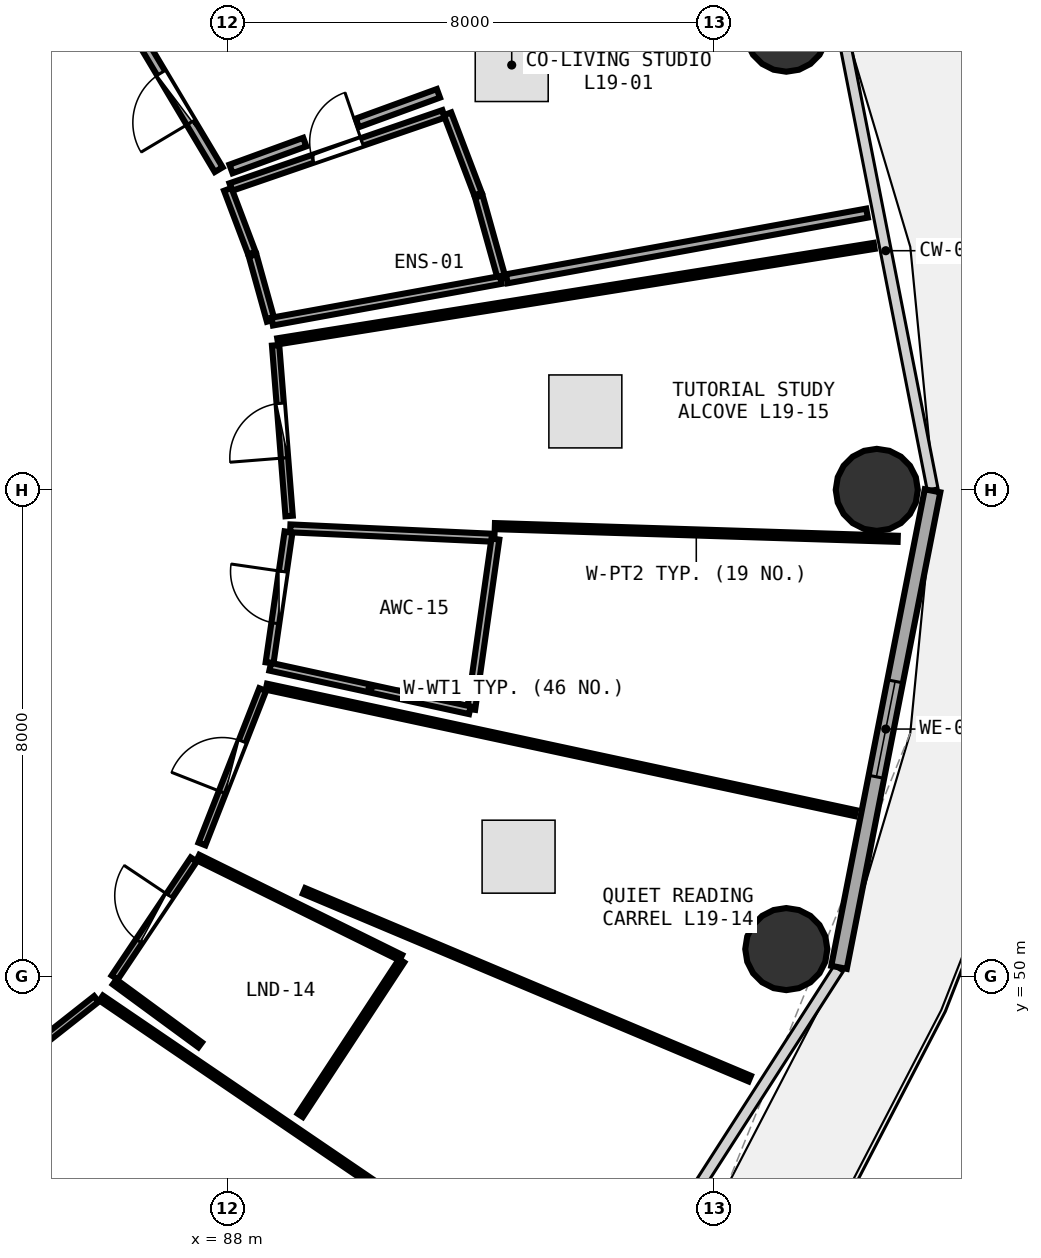
"""IFC4 building model, lengths in metres.
Left out: names, types, materials, properties, quantities, classifications, styles, units other than length and angle.
Written with IfcOpenShell. Run it as: python <this file> out.ifc"""

import sys

from ifc_helpers import new_model, si_unit, direction, frame, frame_2d, origin, origin_2d, place, context, subcontext, project, spatial, rectangle, circle, extrude, element, fill, save


model = new_model("IFC4")
c1 = context("Model", 3, precision=1e-05, world=origin(), true_north=direction((0.0, 1.0)))
c2 = subcontext(c1, "Body", "Model", "MODEL_VIEW")
j1 = project(units=[si_unit("LENGTHUNIT", "METRE"), si_unit("PLANEANGLEUNIT", "RADIAN")], contexts=[c1])
p1 = place(None, origin())
s1 = spatial("IfcSite", under=j1, at=p1, CompositionType="ELEMENT")
p2 = place(p1, origin())
s2 = spatial("IfcBuilding", under=s1, at=p2, CompositionType="ELEMENT")
p3 = place(p2, frame((0.0, 0.0, 76.35)))
s3 = spatial("IfcBuildingStorey", under=s2, at=p3, CompositionType="ELEMENT", Elevation=76.35)
for number, where, z_axis, x_axis in (
    (1, (98.68, 58.0, 0.0), (0.0, 0.0, 1.0), (1.0, 0.0, 0.0)),
    (2, (97.192, 65.552, 0.0), (0.0, 0.0, 1.0), (1.0, 0.0, 0.0)),
    (3, (97.192, 50.448, 0.0), (0.0, 0.0, 1.0), (1.0, 0.0, 0.0)),
):
    element("IfcColumn", number, at=place(p3, frame(where, z_axis=z_axis, x_axis=x_axis)), inside=s3, PredefinedType="COLUMN", context=c2, shape_type="SweptSolid", body=[
        extrude(circle(Radius=0.675, at=origin_2d()), origin(), (0.0, 0.0, 1.0), 3.75),
    ])
p4 = place(p3, frame((98.059, 50.148, 0.0), z_axis=(0.0, 0.0, 1.0), x_axis=(0.192581843632, 0.981280914674, 0.0)))
e4 = element("IfcWall", 4, at=p4, inside=s3, PredefinedType="SOLIDWALL", context=c2, shape_type="SweptSolid", body=[
    extrude(rectangle(XDim=7.987, YDim=0.26, at=frame_2d((3.993, 0.0))), origin(), (0.0, 0.0, 1.0), 3.475),
])
p5 = place(p4, frame((3.193, 0.0, 0.85)))
e5 = element("IfcOpeningElement", 5, at=p5, cuts=e4, PredefinedType="OPENING", context=c2, shape_type="SweptSolid", body=[
    extrude(rectangle(XDim=1.6, YDim=1.45, at=frame_2d((0.8, 0.725))), frame((0.0, 0.14, 0.0), z_axis=(0.0, -1.0, 0.0), x_axis=(1.0, 0.0, 0.0)), (0.0, 0.0, 1.0), 0.28),
])
p6 = place(p3, frame((88.056, 62.98, 0.0), z_axis=(0.0, 0.0, 1.0), x_axis=(0.94570750663, 0.325018940838, 0.0)))
e6 = element("IfcWall", 6, at=p6, inside=s3, PredefinedType="PLUMBINGWALL", context=c2, shape_type="SweptSolid", body=[
    extrude(rectangle(XDim=3.702, YDim=0.13, at=frame_2d((1.851, 0.0))), origin(), (0.0, 0.0, 1.0), 3.175),
])
p7 = place(p6, frame((1.421, 0.0, 0.0)))
e7 = element("IfcOpeningElement", 7, at=p7, cuts=e6, PredefinedType="OPENING", context=c2, shape_type="SweptSolid", body=[
    extrude(rectangle(XDim=0.86, YDim=2.05, at=frame_2d((0.43, 1.025))), frame((0.0, 0.075, 0.0), z_axis=(0.0, -1.0, 0.0), x_axis=(1.0, 0.0, 0.0)), (0.0, 0.0, 1.0), 0.15),
])
p8 = place(p3, frame((87.856, 63.267, 0.0), z_axis=(0.0, 0.0, 1.0), x_axis=(-0.512288635556, 0.858813340535, 0.0)))
e8 = element("IfcWall", 8, at=p8, inside=s3, PredefinedType="PARTITIONING", context=c2, shape_type="SweptSolid", body=[
    extrude(rectangle(XDim=2.751, YDim=0.15, at=frame_2d((1.375, 0.0))), origin(), (0.0, 0.0, 1.0), 2.925),
])
p9 = place(p8, frame((0.901, 0.0, 0.0)))
e9 = element("IfcOpeningElement", 9, at=p9, cuts=e8, PredefinedType="OPENING", context=c2, shape_type="SweptSolid", body=[
    extrude(rectangle(XDim=0.95, YDim=2.08, at=frame_2d((0.475, 1.04))), frame((0.0, 0.085, 0.0), z_axis=(0.0, -1.0, 0.0), x_axis=(1.0, 0.0, 0.0)), (0.0, 0.0, 1.0), 0.17),
])
p10 = place(p3, frame((81.494, 46.198, 0.0), z_axis=(0.0, 0.0, 1.0), x_axis=(0.785315722545, 0.619095482074, 0.0)))
e10 = element("IfcWall", 10, at=p10, inside=s3, PredefinedType="PARTITIONING", context=c2, shape_type="SweptSolid", body=[
    extrude(rectangle(XDim=5.54, YDim=0.12, at=frame_2d((2.77, 0.0))), origin(), (0.0, 0.0, 1.0), 2.925),
])
p11 = place(p10, frame((2.32, 0.0, 0.0)))
e11 = element("IfcOpeningElement", 11, at=p11, cuts=e10, PredefinedType="OPENING", context=c2, shape_type="SweptSolid", body=[
    extrude(rectangle(XDim=0.9, YDim=2.08, at=frame_2d((0.45, 1.04))), frame((0.0, 0.07, 0.0), z_axis=(0.0, -1.0, 0.0), x_axis=(1.0, 0.0, 0.0)), (0.0, 0.0, 1.0), 0.14),
])
p12 = place(p3, frame((86.146, 49.981, 0.0), z_axis=(0.0, 0.0, 1.0), x_axis=(0.556604342457, 0.83077771152, 0.0)))
e12 = element("IfcWall", 12, at=p12, inside=s3, PredefinedType="PARTITIONING", context=c2, shape_type="SweptSolid", body=[
    extrude(rectangle(XDim=2.336, YDim=0.12, at=frame_2d((1.168, 0.0))), origin(), (0.0, 0.0, 1.0), 2.925),
])
p13 = place(p12, frame((0.718, 0.0, 0.0)))
e13 = element("IfcOpeningElement", 13, at=p13, cuts=e12, PredefinedType="OPENING", context=c2, shape_type="SweptSolid", body=[
    extrude(rectangle(XDim=0.9, YDim=2.08, at=frame_2d((0.45, 1.04))), frame((0.0, 0.07, 0.0), z_axis=(0.0, -1.0, 0.0), x_axis=(1.0, 0.0, 0.0)), (0.0, 0.0, 1.0), 0.14),
])
p14 = place(p3, frame((87.582, 52.177, 0.0), z_axis=(0.0, 0.0, 1.0), x_axis=(0.365846135531, 0.930675348936, 0.0)))
e14 = element("IfcWall", 14, at=p14, inside=s3, PredefinedType="PARTITIONING", context=c2, shape_type="SweptSolid", body=[
    extrude(rectangle(XDim=2.729, YDim=0.12, at=frame_2d((1.364, 0.0))), origin(), (0.0, 0.0, 1.0), 3.235),
])
p15 = place(p14, frame((0.914, 0.0, 0.0)))
e15 = element("IfcOpeningElement", 15, at=p15, cuts=e14, PredefinedType="OPENING", context=c2, shape_type="SweptSolid", body=[
    extrude(rectangle(XDim=0.9, YDim=2.08, at=frame_2d((0.45, 1.04))), frame((0.0, 0.07, 0.0), z_axis=(0.0, -1.0, 0.0), x_axis=(1.0, 0.0, 0.0)), (0.0, 0.0, 1.0), 0.14),
])
p16 = place(p3, frame((88.694, 55.156, 0.0), z_axis=(0.0, 0.0, 1.0), x_axis=(0.14330641518, 0.989678367637, 0.0)))
e16 = element("IfcWall", 16, at=p16, inside=s3, PredefinedType="PLUMBINGWALL", context=c2, shape_type="SweptSolid", body=[
    extrude(rectangle(XDim=2.176, YDim=0.13, at=frame_2d((1.088, 0.0))), origin(), (0.0, 0.0, 1.0), 3.48),
])
p17 = place(p16, frame((0.658, 0.0, 0.0)))
e17 = element("IfcOpeningElement", 17, at=p17, cuts=e16, PredefinedType="OPENING", context=c2, shape_type="SweptSolid", body=[
    extrude(rectangle(XDim=0.86, YDim=2.05, at=frame_2d((0.43, 1.025))), frame((0.0, 0.075, 0.0), z_axis=(0.0, -1.0, 0.0), x_axis=(1.0, 0.0, 0.0)), (0.0, 0.0, 1.0), 0.15),
])
p18 = place(p3, frame((89.015, 57.571, 0.0), z_axis=(0.0, 0.0, 1.0), x_axis=(-0.079090310477, 0.996867454975, 0.0)))
e18 = element("IfcWall", 18, at=p18, inside=s3, PredefinedType="PARTITIONING", context=c2, shape_type="SweptSolid", body=[
    extrude(rectangle(XDim=2.815, YDim=0.12, at=frame_2d((1.408, 0.0))), origin(), (0.0, 0.0, 1.0), 2.925),
])
p19 = place(p18, frame((0.958, 0.0, 0.0)))
e19 = element("IfcOpeningElement", 19, at=p19, cuts=e18, PredefinedType="OPENING", context=c2, shape_type="SweptSolid", body=[
    extrude(rectangle(XDim=0.9, YDim=2.08, at=frame_2d((0.45, 1.04))), frame((0.0, 0.07, 0.0), z_axis=(0.0, -1.0, 0.0), x_axis=(1.0, 0.0, 0.0)), (0.0, 0.0, 1.0), 0.14),
])
p20 = place(p3, frame((88.713, 60.783, 0.0), z_axis=(0.0, 0.0, 1.0), x_axis=(-0.267768177699, 0.963483369349, 0.0)))
e20 = element("IfcWall", 20, at=p20, inside=s3, PredefinedType="PLUMBINGWALL", context=c2, shape_type="SweptSolid", body=[
    extrude(rectangle(XDim=1.114, YDim=0.13, at=frame_2d((0.557, 0.0))), origin(), (0.0, 0.0, 1.0), 3.48),
])
p21 = place(p3, frame((88.402, 61.895, 0.0), z_axis=(0.0, 0.0, 1.0), x_axis=(-0.353392089541, 0.935475296868, 0.0)))
e21 = element("IfcWall", 21, at=p21, inside=s3, PredefinedType="PLUMBINGWALL", context=c2, shape_type="SweptSolid", body=[
    extrude(rectangle(XDim=1.12, YDim=0.13, at=frame_2d((0.56, 0.0))), origin(), (0.0, 0.0, 1.0), 3.235),
])
p22 = place(p3, frame((91.62, 64.184, 0.0), z_axis=(0.0, 0.0, 1.0), x_axis=(0.355383981736, -0.934720399652, 0.0)))
e22 = element("IfcWall", 22, at=p22, inside=s3, PredefinedType="PLUMBINGWALL", context=c2, shape_type="SweptSolid", body=[
    extrude(rectangle(XDim=1.412, YDim=0.13, at=frame_2d((0.706, 0.0))), origin(), (0.0, 0.0, 1.0), 3.48),
])
p23 = place(p3, frame((92.135, 62.827, 0.0), z_axis=(0.0, 0.0, 1.0), x_axis=(0.268855284743, -0.963180583206, 0.0)))
e23 = element("IfcWall", 23, at=p23, inside=s3, PredefinedType="PLUMBINGWALL", context=c2, shape_type="SweptSolid", body=[
    extrude(rectangle(XDim=1.403, YDim=0.13, at=frame_2d((0.702, 0.0))), origin(), (0.0, 0.0, 1.0), 3.48),
])
p24 = place(p3, frame((92.497, 61.452, 0.0), z_axis=(0.0, 0.0, 1.0), x_axis=(-0.983811592037, -0.17920589101, 0.0)))
e24 = element("IfcWall", 24, at=p24, inside=s3, PredefinedType="PLUMBINGWALL", context=c2, shape_type="SweptSolid", body=[
    extrude(rectangle(XDim=3.821, YDim=0.13, at=frame_2d((1.911, 0.0))), origin(), (0.0, 0.0, 1.0), 3.175),
])
p25 = place(p3, frame((98.52, 62.552, 0.0), z_axis=(0.0, 0.0, 1.0), x_axis=(-0.983768558102, -0.17944197973, 0.0)))
e25 = element("IfcWall", 25, at=p25, inside=s3, PredefinedType="PARTITIONING", context=c2, shape_type="SweptSolid", body=[
    extrude(rectangle(XDim=6.022, YDim=0.15, at=frame_2d((3.011, 0.0))), origin(), (0.0, 0.0, 1.0), 2.975),
])
p26 = place(p3, frame((91.47, 64.521, 0.0), z_axis=(0.0, 0.0, 1.0), x_axis=(-0.939526959999, -0.342474950084, 0.0)))
e26 = element("IfcWall", 26, at=p26, inside=s3, PredefinedType="PARTITIONING", context=c2, shape_type="SweptSolid", body=[
    extrude(rectangle(XDim=1.419, YDim=0.15, at=frame_2d((0.71, 0.0))), origin(), (0.0, 0.0, 1.0), 3.175),
])
p27 = place(p3, frame((89.272, 63.72, 0.0), z_axis=(0.0, 0.0, 1.0), x_axis=(-0.939522570491, -0.342486991779, 0.0)))
e27 = element("IfcWall", 27, at=p27, inside=s3, PredefinedType="PARTITIONING", context=c2, shape_type="SweptSolid", body=[
    extrude(rectangle(XDim=1.291, YDim=0.15, at=frame_2d((0.646, 0.0))), origin(), (0.0, 0.0, 1.0), 3.235),
])
p28 = place(p3, frame((85.925, 49.643, 0.0), z_axis=(0.0, 0.0, 1.0), x_axis=(0.826688408753, -0.562659999319, 0.0)))
e28 = element("IfcWall", 28, at=p28, inside=s3, PredefinedType="PARTITIONING", context=c2, shape_type="SweptSolid", body=[
    extrude(rectangle(XDim=9.539, YDim=0.1, at=frame_2d((4.77, 0.0))), origin(), (0.0, 0.0, 1.0), 2.975),
])
p29 = place(p3, frame((87.516, 51.953, 0.0), z_axis=(0.0, 0.0, 1.0), x_axis=(0.896816300292, -0.442403123328, 0.0)))
e29 = element("IfcWall", 29, at=p29, inside=s3, PredefinedType="PARTITIONING", context=c2, shape_type="SweptSolid", body=[
    extrude(rectangle(XDim=3.72, YDim=0.1, at=frame_2d((1.86, 0.0))), origin(), (0.0, 0.0, 1.0), 2.925),
])
p30 = place(p3, frame((90.866, 50.257, 0.0), z_axis=(0.0, 0.0, 1.0), x_axis=(-0.548626626693, -0.836067476035, 0.0)))
e30 = element("IfcWall", 30, at=p30, inside=s3, PredefinedType="PARTITIONING", context=c2, shape_type="SweptSolid", body=[
    extrude(rectangle(XDim=3.041, YDim=0.1, at=frame_2d((1.521, 0.0))), origin(), (0.0, 0.0, 1.0), 3.175),
])
p31 = place(p3, frame((87.552, 48.874, 0.0), z_axis=(0.0, 0.0, 1.0), x_axis=(-0.805902241708, 0.592048627065, 0.0)))
e31 = element("IfcWall", 31, at=p31, inside=s3, PredefinedType="PARTITIONING", context=c2, shape_type="SweptSolid", body=[
    extrude(rectangle(XDim=1.746, YDim=0.1, at=frame_2d((0.873, 0.0))), origin(), (0.0, 0.0, 1.0), 3.235),
])
p32 = place(p3, frame((88.641, 54.764, 0.0), z_axis=(0.0, 0.0, 1.0), x_axis=(0.97772336182, -0.209897660187, 0.0)))
e32 = element("IfcWall", 32, at=p32, inside=s3, PredefinedType="PARTITIONING", context=c2, shape_type="SweptSolid", body=[
    extrude(rectangle(XDim=9.906, YDim=0.1, at=frame_2d((4.953, 0.0))), origin(), (0.0, 0.0, 1.0), 2.975),
])
p33 = place(p3, frame((96.59, 48.319, 0.0), z_axis=(0.0, 0.0, 1.0), x_axis=(-0.92163364156, 0.388061117279, 0.0)))
e33 = element("IfcWall", 33, at=p33, inside=s3, PredefinedType="PARTITIONING", context=c2, shape_type="SweptSolid", body=[
    extrude(rectangle(XDim=7.953, YDim=0.1, at=frame_2d((3.977, 0.0))), origin(), (0.0, 0.0, 1.0), 2.925),
])
p34 = place(p3, frame((89.034, 57.367, 0.0), z_axis=(0.0, 0.0, 1.0), x_axis=(0.998931351305, -0.046218560994, 0.0)))
e34 = element("IfcWall", 34, at=p34, inside=s3, PredefinedType="PLUMBINGWALL", context=c2, shape_type="SweptSolid", body=[
    extrude(rectangle(XDim=3.36, YDim=0.13, at=frame_2d((1.68, 0.0))), origin(), (0.0, 0.0, 1.0), 3.175),
])
p35 = place(p3, frame((92.407, 57.191, 0.0), z_axis=(0.0, 0.0, 1.0), x_axis=(-0.140575090878, -0.990070019658, 0.0)))
e35 = element("IfcWall", 35, at=p35, inside=s3, PredefinedType="PLUMBINGWALL", context=c2, shape_type="SweptSolid", body=[
    extrude(rectangle(XDim=2.827, YDim=0.13, at=frame_2d((1.414, 0.0))), origin(), (0.0, 0.0, 1.0), 3.48),
])
p36 = place(p3, frame((91.988, 54.376, 0.0), z_axis=(0.0, 0.0, 1.0), x_axis=(-0.977059488183, 0.212966562048, 0.0)))
e36 = element("IfcWall", 36, at=p36, inside=s3, PredefinedType="PLUMBINGWALL", context=c2, shape_type="SweptSolid", body=[
    extrude(rectangle(XDim=3.36, YDim=0.13, at=frame_2d((1.68, 0.0))), origin(), (0.0, 0.0, 1.0), 3.175),
])
p37 = place(p3, frame((88.827, 60.443, 0.0), z_axis=(0.0, 0.0, 1.0), x_axis=(0.987442472226, 0.157978998742, 0.0)))
e37 = element("IfcWall", 37, at=p37, inside=s3, PredefinedType="PARTITIONING", context=c2, shape_type="SweptSolid", body=[
    extrude(rectangle(XDim=9.934, YDim=0.1, at=frame_2d((4.967, 0.0))), origin(), (0.0, 0.0, 1.0), 2.975),
])
p38 = place(p3, frame((99.024, 57.195, 0.0), z_axis=(0.0, 0.0, 1.0), x_axis=(-0.999502833447, 0.031529128296, 0.0)))
e38 = element("IfcWall", 38, at=p38, inside=s3, PredefinedType="PARTITIONING", context=c2, shape_type="SweptSolid", body=[
    extrude(rectangle(XDim=6.628, YDim=0.1, at=frame_2d((3.314, 0.0))), origin(), (0.0, 0.0, 1.0), 2.975),
])
p39 = place(p5, origin())
e39 = element("IfcWindow", 39, at=p39, inside=s3, PartitioningType="SINGLE_PANEL", PredefinedType="WINDOW", context=c2, shape_type="SweptSolid", body=[
    extrude(rectangle(XDim=1.6, YDim=1.45, at=frame_2d((0.8, 0.725))), frame((0.0, 0.03, 0.0), z_axis=(0.0, -1.0, 0.0), x_axis=(1.0, 0.0, 0.0)), (0.0, 0.0, 1.0), 0.06),
])
fill(e5, e39)
p40 = place(p7, origin())
e40 = element("IfcDoor", 40, at=p40, inside=s3, OperationType="SINGLE_SWING_RIGHT", PredefinedType="DOOR", context=c2, shape_type="SweptSolid", body=[
    extrude(rectangle(XDim=0.86, YDim=2.05, at=frame_2d((0.43, 1.025))), frame((0.0, 0.025, 0.0), z_axis=(0.0, -1.0, 0.0), x_axis=(1.0, 0.0, 0.0)), (0.0, 0.0, 1.0), 0.05),
])
fill(e7, e40)
p41 = place(p9, origin())
e41 = element("IfcDoor", 41, at=p41, inside=s3, OperationType="SINGLE_SWING_LEFT", PredefinedType="DOOR", context=c2, shape_type="SweptSolid", body=[
    extrude(rectangle(XDim=0.95, YDim=2.08, at=frame_2d((0.475, 1.04))), frame((0.0, 0.025, 0.0), z_axis=(0.0, -1.0, 0.0), x_axis=(1.0, 0.0, 0.0)), (0.0, 0.0, 1.0), 0.05),
])
fill(e9, e41)
p42 = place(p13, origin())
e42 = element("IfcDoor", 42, at=p42, inside=s3, OperationType="SINGLE_SWING_RIGHT", PredefinedType="DOOR", context=c2, shape_type="SweptSolid", body=[
    extrude(rectangle(XDim=0.9, YDim=2.08, at=frame_2d((0.45, 1.04))), frame((0.0, 0.025, 0.0), z_axis=(0.0, -1.0, 0.0), x_axis=(1.0, 0.0, 0.0)), (0.0, 0.0, 1.0), 0.05),
])
fill(e13, e42)
p43 = place(p15, origin())
e43 = element("IfcDoor", 43, at=p43, inside=s3, OperationType="SINGLE_SWING_LEFT", PredefinedType="DOOR", context=c2, shape_type="SweptSolid", body=[
    extrude(rectangle(XDim=0.9, YDim=2.08, at=frame_2d((0.45, 1.04))), frame((0.0, 0.025, 0.0), z_axis=(0.0, -1.0, 0.0), x_axis=(1.0, 0.0, 0.0)), (0.0, 0.0, 1.0), 0.05),
])
fill(e15, e43)
p44 = place(p17, origin())
e44 = element("IfcDoor", 44, at=p44, inside=s3, OperationType="SINGLE_SWING_RIGHT", PredefinedType="DOOR", context=c2, shape_type="SweptSolid", body=[
    extrude(rectangle(XDim=0.86, YDim=2.05, at=frame_2d((0.43, 1.025))), frame((0.0, 0.025, 0.0), z_axis=(0.0, -1.0, 0.0), x_axis=(1.0, 0.0, 0.0)), (0.0, 0.0, 1.0), 0.05),
])
fill(e17, e44)
p45 = place(p19, origin())
e45 = element("IfcDoor", 45, at=p45, inside=s3, OperationType="SINGLE_SWING_LEFT", PredefinedType="DOOR", context=c2, shape_type="SweptSolid", body=[
    extrude(rectangle(XDim=0.9, YDim=2.08, at=frame_2d((0.45, 1.04))), frame((0.0, 0.025, 0.0), z_axis=(0.0, -1.0, 0.0), x_axis=(1.0, 0.0, 0.0)), (0.0, 0.0, 1.0), 0.05),
])
fill(e19, e45)
save(model, sys.argv[1])
